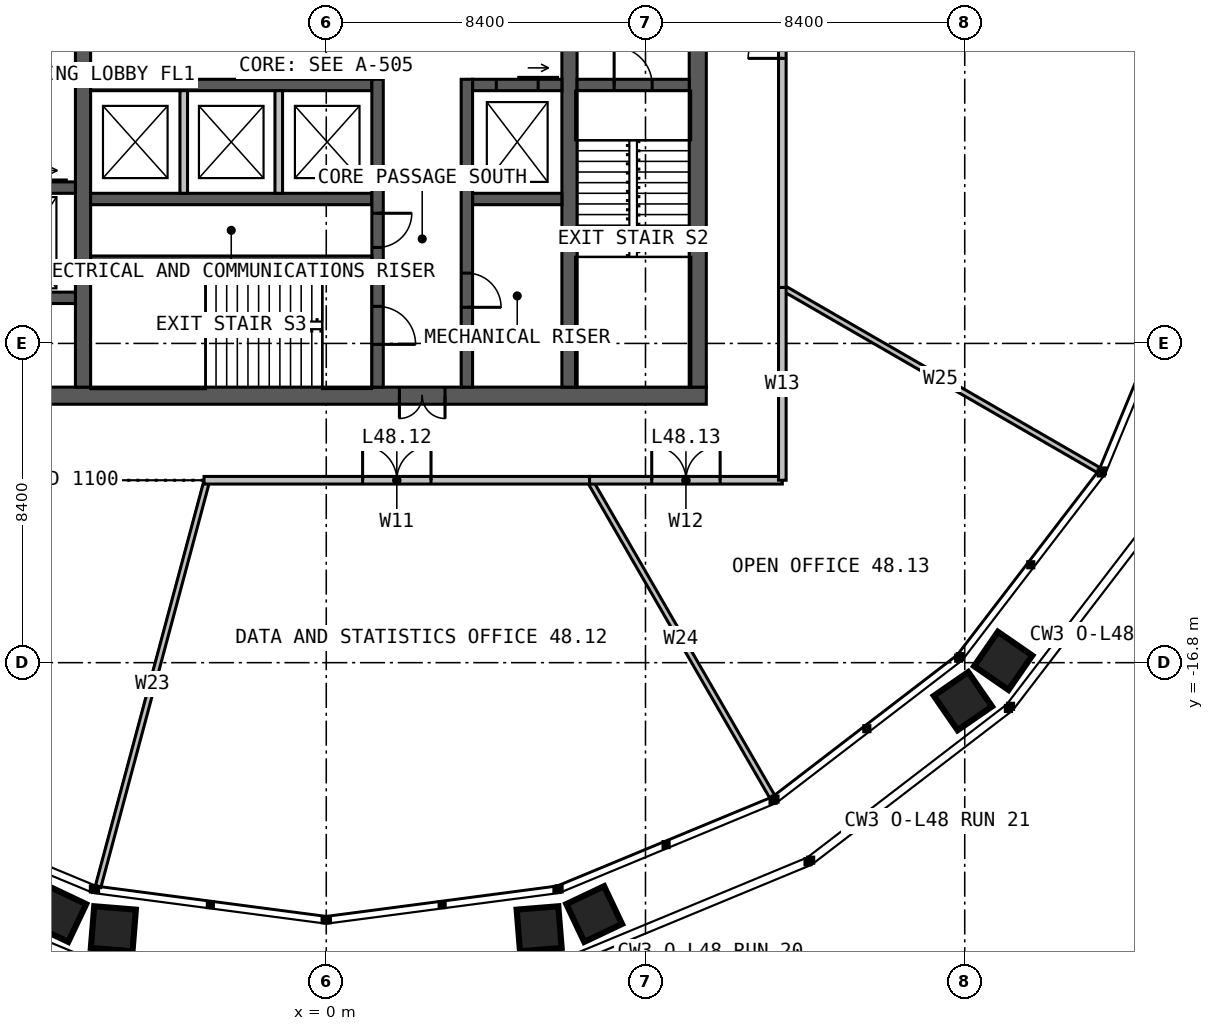
"""IFC4 building model, lengths in metres.
Left out: names, types, materials, properties, quantities, classifications, styles, units other than length and angle.
Written with IfcOpenShell. Run it as: python <this file> out.ifc"""

import sys

from ifc_helpers import new_model, si_unit, direction, frame, frame_2d, origin, place, context, subcontext, project, spatial, rectangle, extrude, element, fill, save


model = new_model("IFC4")
c1 = context("Model", 3, precision=1e-05, world=origin(), true_north=direction((0.0, 1.0)))
c2 = subcontext(c1, "Body", "Model", "MODEL_VIEW")
j1 = project(units=[si_unit("LENGTHUNIT", "METRE"), si_unit("PLANEANGLEUNIT", "RADIAN")], contexts=[c1])
p1 = place(None, origin())
s1 = spatial("IfcSite", under=j1, at=p1, CompositionType="ELEMENT")
p2 = place(p1, origin())
s2 = spatial("IfcBuilding", under=s1, at=p2, CompositionType="ELEMENT")
p3 = place(p2, frame((0.0, 0.0, 199.0)))
s3 = spatial("IfcBuildingStorey", under=s2, at=p3, CompositionType="ELEMENT", Elevation=199.0)
p4 = place(p3, frame((10.0, -9.775, 0.0), z_axis=(0.0, 0.0, 1.0), x_axis=(-1.0, 0.0, 0.0)))
e1 = element("IfcWall", 1, at=p4, inside=s3, PredefinedType="SOLIDWALL", context=c2, shape_type="SweptSolid", body=[
    extrude(rectangle(XDim=20.0, YDim=0.45, at=frame_2d((10.0, 0.0))), origin(), (0.0, 0.0, 1.0), 4.0),
])
p5 = place(p4, frame((6.875, 0.0, 0.0)))
e2 = element("IfcOpeningElement", 2, at=p5, cuts=e1, PredefinedType="OPENING", context=c2, shape_type="SweptSolid", body=[
    extrude(rectangle(XDim=1.2, YDim=2.2, at=frame_2d((0.6, 1.1))), frame((0.0, 0.235, 0.0), z_axis=(0.0, -1.0, 0.0), x_axis=(1.0, 0.0, 0.0)), (0.0, 0.0, 1.0), 0.47),
])
p6 = place(p3, frame((9.775, -9.55, 0.0), z_axis=(0.0, 0.0, 1.0), x_axis=(0.0, 1.0, 0.0)))
e3 = element("IfcWall", 3, at=p6, inside=s3, PredefinedType="SOLIDWALL", context=c2, shape_type="SweptSolid", body=[
    extrude(rectangle(XDim=19.1, YDim=0.45, at=frame_2d((9.55, 0.0))), origin(), (0.0, 0.0, 1.0), 4.0),
])
p7 = place(p3, frame((-6.4, -9.55, 0.0), z_axis=(0.0, 0.0, 1.0), x_axis=(0.0, 1.0, 0.0)))
e4 = element("IfcWall", 4, at=p7, inside=s3, PredefinedType="SOLIDWALL", context=c2, shape_type="SweptSolid", body=[
    extrude(rectangle(XDim=19.1, YDim=0.4, at=frame_2d((9.55, 0.0))), origin(), (0.0, 0.0, 1.0), 4.0),
])
p8 = place(p7, frame((9.05, 0.0, 0.0)))
e5 = element("IfcOpeningElement", 5, at=p8, cuts=e4, PredefinedType="OPENING", context=c2, shape_type="SweptSolid", body=[
    extrude(rectangle(XDim=1.0, YDim=2.2, at=frame_2d((0.5, 1.1))), frame((0.0, 0.21, 0.0), z_axis=(0.0, -1.0, 0.0), x_axis=(1.0, 0.0, 0.0)), (0.0, 0.0, 1.0), 0.42),
])
p9 = place(p3, frame((6.4, 9.55, 0.0), z_axis=(0.0, 0.0, 1.0), x_axis=(0.0, -1.0, 0.0)))
e6 = element("IfcWall", 6, at=p9, inside=s3, PredefinedType="SOLIDWALL", context=c2, shape_type="SweptSolid", body=[
    extrude(rectangle(XDim=19.1, YDim=0.4, at=frame_2d((9.55, 0.0))), origin(), (0.0, 0.0, 1.0), 4.0),
])
p10 = place(p9, frame((9.05, 0.0, 0.0)))
e7 = element("IfcOpeningElement", 7, at=p10, cuts=e6, PredefinedType="OPENING", context=c2, shape_type="SweptSolid", body=[
    extrude(rectangle(XDim=1.0, YDim=2.2, at=frame_2d((0.5, 1.1))), frame((0.0, 0.21, 0.0), z_axis=(0.0, -1.0, 0.0), x_axis=(1.0, 0.0, 0.0)), (0.0, 0.0, 1.0), 0.42),
])
p11 = place(p3, frame((-6.2, -1.6, 0.0), z_axis=(0.0, 0.0, 1.0), x_axis=(1.0, 0.0, 0.0)))
e8 = element("IfcWall", 8, at=p11, inside=s3, PredefinedType="SOLIDWALL", context=c2, shape_type="SweptSolid", body=[
    extrude(rectangle(XDim=7.4, YDim=0.3, at=frame_2d((3.7, 0.0))), origin(), (0.0, 0.0, 1.0), 4.0),
])
p12 = place(p3, frame((3.85, -1.6, 0.0), z_axis=(0.0, 0.0, 1.0), x_axis=(1.0, 0.0, 0.0)))
e9 = element("IfcWall", 9, at=p12, inside=s3, PredefinedType="SOLIDWALL", context=c2, shape_type="SweptSolid", body=[
    extrude(rectangle(XDim=2.35, YDim=0.3, at=frame_2d((1.175, 0.0))), origin(), (0.0, 0.0, 1.0), 4.0),
])
p13 = place(p12, frame((0.625, 0.0, 0.0)))
e10 = element("IfcOpeningElement", 10, at=p13, cuts=e9, PredefinedType="OPENING", context=c2, shape_type="SweptSolid", body=[
    extrude(rectangle(XDim=1.1, YDim=2.2, at=frame_2d((0.55, 1.1))), frame((0.0, 0.16, 0.0), z_axis=(0.0, -1.0, 0.0), x_axis=(1.0, 0.0, 0.0)), (0.0, 0.0, 1.0), 0.32),
])
p14 = place(p3, frame((-6.2, -4.6, 0.0), z_axis=(0.0, 0.0, 1.0), x_axis=(1.0, 0.0, 0.0)))
e11 = element("IfcWall", 11, at=p14, inside=s3, PredefinedType="SOLIDWALL", context=c2, shape_type="SweptSolid", body=[
    extrude(rectangle(XDim=7.4, YDim=0.3, at=frame_2d((3.7, 0.0))), origin(), (0.0, 0.0, 1.0), 4.0),
])
p15 = place(p3, frame((3.85, -4.6, 0.0), z_axis=(0.0, 0.0, 1.0), x_axis=(1.0, 0.0, 0.0)))
e12 = element("IfcWall", 12, at=p15, inside=s3, PredefinedType="SOLIDWALL", context=c2, shape_type="SweptSolid", body=[
    extrude(rectangle(XDim=2.35, YDim=0.3, at=frame_2d((1.175, 0.0))), origin(), (0.0, 0.0, 1.0), 4.0),
])
p16 = place(p3, frame((1.35, -1.45, 0.0), z_axis=(0.0, 0.0, 1.0), x_axis=(0.0, -1.0, 0.0)))
e13 = element("IfcWall", 13, at=p16, inside=s3, PredefinedType="SOLIDWALL", context=c2, shape_type="SweptSolid", body=[
    extrude(rectangle(XDim=8.1, YDim=0.3, at=frame_2d((4.05, 0.0))), origin(), (0.0, 0.0, 1.0), 4.0),
])
p17 = place(p16, frame((5.975, 0.0, 0.0)))
e14 = element("IfcOpeningElement", 14, at=p17, cuts=e13, PredefinedType="OPENING", context=c2, shape_type="SweptSolid", body=[
    extrude(rectangle(XDim=1.0, YDim=2.2, at=frame_2d((0.5, 1.1))), frame((0.0, 0.16, 0.0), z_axis=(0.0, -1.0, 0.0), x_axis=(1.0, 0.0, 0.0)), (0.0, 0.0, 1.0), 0.32),
])
p18 = place(p16, frame((3.525, 0.0, 0.0)))
e15 = element("IfcOpeningElement", 15, at=p18, cuts=e13, PredefinedType="OPENING", context=c2, shape_type="SweptSolid", body=[
    extrude(rectangle(XDim=0.9, YDim=2.2, at=frame_2d((0.45, 1.1))), frame((0.0, 0.16, 0.0), z_axis=(0.0, -1.0, 0.0), x_axis=(1.0, 0.0, 0.0)), (0.0, 0.0, 1.0), 0.32),
])
p19 = place(p3, frame((3.7, -1.45, 0.0), z_axis=(0.0, 0.0, 1.0), x_axis=(0.0, -1.0, 0.0)))
e16 = element("IfcWall", 16, at=p19, inside=s3, PredefinedType="SOLIDWALL", context=c2, shape_type="SweptSolid", body=[
    extrude(rectangle(XDim=8.1, YDim=0.3, at=frame_2d((4.05, 0.0))), origin(), (0.0, 0.0, 1.0), 4.0),
])
p20 = place(p19, frame((5.1, 0.0, 0.0)))
e17 = element("IfcOpeningElement", 17, at=p20, cuts=e16, PredefinedType="OPENING", context=c2, shape_type="SweptSolid", body=[
    extrude(rectangle(XDim=0.9, YDim=2.2, at=frame_2d((0.45, 1.1))), frame((0.0, 0.16, 0.0), z_axis=(0.0, -1.0, 0.0), x_axis=(1.0, 0.0, 0.0)), (0.0, 0.0, 1.0), 0.32),
])
p21 = place(p3, frame((-6.2, -6.2, 0.0), z_axis=(0.0, 0.0, 1.0), x_axis=(1.0, 0.0, 0.0)))
e18 = element("IfcWall", 18, at=p21, inside=s3, PredefinedType="SOLIDWALL", context=c2, shape_type="SweptSolid", body=[
    extrude(rectangle(XDim=7.4, YDim=0.2, at=frame_2d((3.7, 0.0))), origin(), (0.0, 0.0, 1.0), 4.0),
])
p22 = place(p3, frame((6.6, -1.6, 0.0), z_axis=(0.0, 0.0, 1.0), x_axis=(1.0, 0.0, 0.0)))
e19 = element("IfcWall", 19, at=p22, inside=s3, PredefinedType="SOLIDWALL", context=c2, shape_type="SweptSolid", body=[
    extrude(rectangle(XDim=2.95, YDim=0.3, at=frame_2d((1.475, 0.0))), origin(), (0.0, 0.0, 1.0), 4.0),
])
p23 = place(p22, frame((0.975, 0.0, 0.0)))
e20 = element("IfcOpeningElement", 20, at=p23, cuts=e19, PredefinedType="OPENING", context=c2, shape_type="SweptSolid", body=[
    extrude(rectangle(XDim=1.0, YDim=2.2, at=frame_2d((0.5, 1.1))), frame((0.0, 0.16, 0.0), z_axis=(0.0, -1.0, 0.0), x_axis=(1.0, 0.0, 0.0)), (0.0, 0.0, 1.0), 0.32),
])
p24 = place(p3, frame((-9.55, -4.3, 0.0), z_axis=(0.0, 0.0, 1.0), x_axis=(1.0, 0.0, 0.0)))
e21 = element("IfcWall", 21, at=p24, inside=s3, PredefinedType="SOLIDWALL", context=c2, shape_type="SweptSolid", body=[
    extrude(rectangle(XDim=2.95, YDim=0.3, at=frame_2d((1.475, 0.0))), origin(), (0.0, 0.0, 1.0), 4.0),
])
p25 = place(p24, frame((1.1, 0.0, 0.0)))
e22 = element("IfcOpeningElement", 22, at=p25, cuts=e21, PredefinedType="OPENING", context=c2, shape_type="SweptSolid", body=[
    extrude(rectangle(XDim=1.1, YDim=2.2, at=frame_2d((0.55, 1.1))), frame((0.0, 0.16, 0.0), z_axis=(0.0, -1.0, 0.0), x_axis=(1.0, 0.0, 0.0)), (0.0, 0.0, 1.0), 0.32),
])
p26 = place(p3, frame((-9.55, -7.2, 0.0), z_axis=(0.0, 0.0, 1.0), x_axis=(1.0, 0.0, 0.0)))
e23 = element("IfcWall", 23, at=p26, inside=s3, PredefinedType="SOLIDWALL", context=c2, shape_type="SweptSolid", body=[
    extrude(rectangle(XDim=2.95, YDim=0.3, at=frame_2d((1.475, 0.0))), origin(), (0.0, 0.0, 1.0), 4.0),
])
for number, where, z_axis, x_axis in (
    (24, (-3.75, -1.75, 0.0), (0.0, 0.0, 1.0), (0.0, -1.0, 0.0)),
    (25, (-1.25, -1.75, 0.0), (0.0, 0.0, 1.0), (0.0, -1.0, 0.0)),
):
    element("IfcWall", number, at=place(p3, frame(where, z_axis=z_axis, x_axis=x_axis)), inside=s3, PredefinedType="SOLIDWALL", context=c2, shape_type="SweptSolid", body=[
        extrude(rectangle(XDim=2.7, YDim=0.2, at=frame_2d((1.35, 0.0))), origin(), (0.0, 0.0, 1.0), 3.75),
    ])
p27 = place(p3, frame((12.0, -6.928, 0.0), z_axis=(0.0, 0.0, 1.0), x_axis=(0.866030904871, -0.499990471717, 0.0)))
e26 = element("IfcWall", 26, at=p27, inside=s3, PredefinedType="PARTITIONING", context=c2, shape_type="SweptSolid", body=[
    extrude(rectangle(XDim=9.62, YDim=0.15, at=frame_2d((4.81, 0.0))), origin(), (0.0, 0.0, 1.0), 2.79),
])
p28 = place(p3, frame((-3.143, -12.02, 0.0), z_axis=(0.0, 0.0, 1.0), x_axis=(-0.258810426797, -0.965928135516, 0.0)))
e27 = element("IfcWall", 27, at=p28, inside=s3, PredefinedType="PARTITIONING", context=c2, shape_type="SweptSolid", body=[
    extrude(rectangle(XDim=11.053, YDim=0.15, at=frame_2d((5.526, 0.0))), origin(), (0.0, 0.0, 1.0), 2.79),
])
p29 = place(p3, frame((6.928, -12.0, 0.0), z_axis=(0.0, 0.0, 1.0), x_axis=(0.499990471717, -0.866030904871, 0.0)))
e28 = element("IfcWall", 28, at=p29, inside=s3, PredefinedType="PARTITIONING", context=c2, shape_type="SweptSolid", body=[
    extrude(rectangle(XDim=9.62, YDim=0.15, at=frame_2d((4.81, 0.0))), origin(), (0.0, 0.0, 1.0), 2.79),
])
p30 = place(p3, frame((12.0, -6.928, 0.0), z_axis=(0.0, 0.0, 1.0), x_axis=(0.0, 1.0, 0.0)))
e29 = element("IfcWall", 29, at=p30, inside=s3, PredefinedType="PARTITIONING", context=c2, shape_type="SweptSolid", body=[
    extrude(rectangle(XDim=13.856, YDim=0.2, at=frame_2d((6.928, 0.0))), origin(), (0.0, 0.0, 1.0), 3.8),
])
p31 = place(p30, frame((6.028, 0.0, 0.0)))
e30 = element("IfcOpeningElement", 30, at=p31, cuts=e29, PredefinedType="OPENING", context=c2, shape_type="SweptSolid", body=[
    extrude(rectangle(XDim=1.8, YDim=2.2, at=frame_2d((0.9, 1.1))), frame((0.0, 0.11, 0.0), z_axis=(0.0, -1.0, 0.0), x_axis=(1.0, 0.0, 0.0)), (0.0, 0.0, 1.0), 0.22),
])
p32 = place(p3, frame((-3.215, -12.0, 0.0), z_axis=(0.0, 0.0, 1.0), x_axis=(1.0, 0.0, 0.0)))
e31 = element("IfcWall", 31, at=p32, inside=s3, PredefinedType="PARTITIONING", context=c2, shape_type="SweptSolid", body=[
    extrude(rectangle(XDim=10.144, YDim=0.2, at=frame_2d((5.072, 0.0))), origin(), (0.0, 0.0, 1.0), 3.8),
])
p33 = place(p32, frame((4.172, 0.0, 0.0)))
e32 = element("IfcOpeningElement", 32, at=p33, cuts=e31, PredefinedType="OPENING", context=c2, shape_type="SweptSolid", body=[
    extrude(rectangle(XDim=1.8, YDim=2.2, at=frame_2d((0.9, 1.1))), frame((0.0, 0.11, 0.0), z_axis=(0.0, -1.0, 0.0), x_axis=(1.0, 0.0, 0.0)), (0.0, 0.0, 1.0), 0.22),
])
p34 = place(p3, frame((6.928, -12.0, 0.0), z_axis=(0.0, 0.0, 1.0), x_axis=(1.0, 0.0, 0.0)))
e33 = element("IfcWall", 33, at=p34, inside=s3, PredefinedType="PARTITIONING", context=c2, shape_type="SweptSolid", body=[
    extrude(rectangle(XDim=5.072, YDim=0.2, at=frame_2d((2.536, 0.0))), origin(), (0.0, 0.0, 1.0), 3.8),
])
p35 = place(p34, frame((1.636, 0.0, 0.0)))
e34 = element("IfcOpeningElement", 34, at=p35, cuts=e33, PredefinedType="OPENING", context=c2, shape_type="SweptSolid", body=[
    extrude(rectangle(XDim=1.8, YDim=2.2, at=frame_2d((0.9, 1.1))), frame((0.0, 0.11, 0.0), z_axis=(0.0, -1.0, 0.0), x_axis=(1.0, 0.0, 0.0)), (0.0, 0.0, 1.0), 0.22),
])
p36 = place(p3, frame((12.0, -12.0, 0.0), z_axis=(0.0, 0.0, 1.0), x_axis=(0.0, 1.0, 0.0)))
e35 = element("IfcWall", 35, at=p36, inside=s3, PredefinedType="PARTITIONING", context=c2, shape_type="SweptSolid", body=[
    extrude(rectangle(XDim=5.072, YDim=0.2, at=frame_2d((2.536, 0.0))), origin(), (0.0, 0.0, 1.0), 3.8),
])
p37 = place(p5, origin())
e36 = element("IfcDoor", 36, at=p37, inside=s3, OperationType="DOUBLE_DOOR_SINGLE_SWING", PredefinedType="DOOR", context=c2, shape_type="SweptSolid", body=[
    extrude(rectangle(XDim=1.2, YDim=2.2, at=frame_2d((0.6, 1.1))), frame((0.0, 0.025, 0.0), z_axis=(0.0, -1.0, 0.0), x_axis=(1.0, 0.0, 0.0)), (0.0, 0.0, 1.0), 0.05),
])
fill(e2, e36)
p38 = place(p23, origin())
e37 = element("IfcDoor", 37, at=p38, inside=s3, OperationType="SINGLE_SWING_LEFT", PredefinedType="DOOR", context=c2, shape_type="SweptSolid", body=[
    extrude(rectangle(XDim=1.0, YDim=2.2, at=frame_2d((0.5, 1.1))), frame((0.0, 0.025, 0.0), z_axis=(0.0, -1.0, 0.0), x_axis=(1.0, 0.0, 0.0)), (0.0, 0.0, 1.0), 0.05),
])
fill(e20, e37)
p39 = place(p17, origin())
e38 = element("IfcDoor", 38, at=p39, inside=s3, OperationType="SINGLE_SWING_RIGHT", PredefinedType="DOOR", context=c2, shape_type="SweptSolid", body=[
    extrude(rectangle(XDim=1.0, YDim=2.2, at=frame_2d((0.5, 1.1))), frame((0.0, 0.025, 0.0), z_axis=(0.0, -1.0, 0.0), x_axis=(1.0, 0.0, 0.0)), (0.0, 0.0, 1.0), 0.05),
])
fill(e14, e38)
p40 = place(p18, origin())
e39 = element("IfcDoor", 39, at=p40, inside=s3, OperationType="SINGLE_SWING_LEFT", PredefinedType="DOOR", context=c2, shape_type="SweptSolid", body=[
    extrude(rectangle(XDim=0.9, YDim=2.2, at=frame_2d((0.45, 1.1))), frame((0.0, 0.025, 0.0), z_axis=(0.0, -1.0, 0.0), x_axis=(1.0, 0.0, 0.0)), (0.0, 0.0, 1.0), 0.05),
])
fill(e15, e39)
p41 = place(p20, origin())
e40 = element("IfcDoor", 40, at=p41, inside=s3, OperationType="SINGLE_SWING_RIGHT", PredefinedType="DOOR", context=c2, shape_type="SweptSolid", body=[
    extrude(rectangle(XDim=0.9, YDim=2.2, at=frame_2d((0.45, 1.1))), frame((0.0, 0.025, 0.0), z_axis=(0.0, -1.0, 0.0), x_axis=(1.0, 0.0, 0.0)), (0.0, 0.0, 1.0), 0.05),
])
fill(e17, e40)
p42 = place(p13, origin())
e41 = element("IfcDoor", 41, at=p42, inside=s3, OperationType="SLIDING_TO_LEFT", PredefinedType="DOOR", context=c2, shape_type="SweptSolid", body=[
    extrude(rectangle(XDim=1.1, YDim=2.2, at=frame_2d((0.55, 1.1))), frame((0.0, 0.025, 0.0), z_axis=(0.0, -1.0, 0.0), x_axis=(1.0, 0.0, 0.0)), (0.0, 0.0, 1.0), 0.05),
])
fill(e10, e41)
p43 = place(p31, origin())
e42 = element("IfcDoor", 42, at=p43, inside=s3, OperationType="DOUBLE_DOOR_SINGLE_SWING", PredefinedType="DOOR", context=c2, shape_type="SweptSolid", body=[
    extrude(rectangle(XDim=1.8, YDim=2.2, at=frame_2d((0.9, 1.1))), frame((0.0, 0.025, 0.0), z_axis=(0.0, -1.0, 0.0), x_axis=(1.0, 0.0, 0.0)), (0.0, 0.0, 1.0), 0.05),
])
fill(e30, e42)
p44 = place(p33, origin())
e43 = element("IfcDoor", 43, at=p44, inside=s3, OperationType="DOUBLE_DOOR_SINGLE_SWING", PredefinedType="DOOR", context=c2, shape_type="SweptSolid", body=[
    extrude(rectangle(XDim=1.8, YDim=2.2, at=frame_2d((0.9, 1.1))), frame((0.0, 0.025, 0.0), z_axis=(0.0, -1.0, 0.0), x_axis=(1.0, 0.0, 0.0)), (0.0, 0.0, 1.0), 0.05),
])
fill(e32, e43)
p45 = place(p35, origin())
e44 = element("IfcDoor", 44, at=p45, inside=s3, OperationType="DOUBLE_DOOR_SINGLE_SWING", PredefinedType="DOOR", context=c2, shape_type="SweptSolid", body=[
    extrude(rectangle(XDim=1.8, YDim=2.2, at=frame_2d((0.9, 1.1))), frame((0.0, 0.025, 0.0), z_axis=(0.0, -1.0, 0.0), x_axis=(1.0, 0.0, 0.0)), (0.0, 0.0, 1.0), 0.05),
])
fill(e34, e44)
save(model, sys.argv[1])
